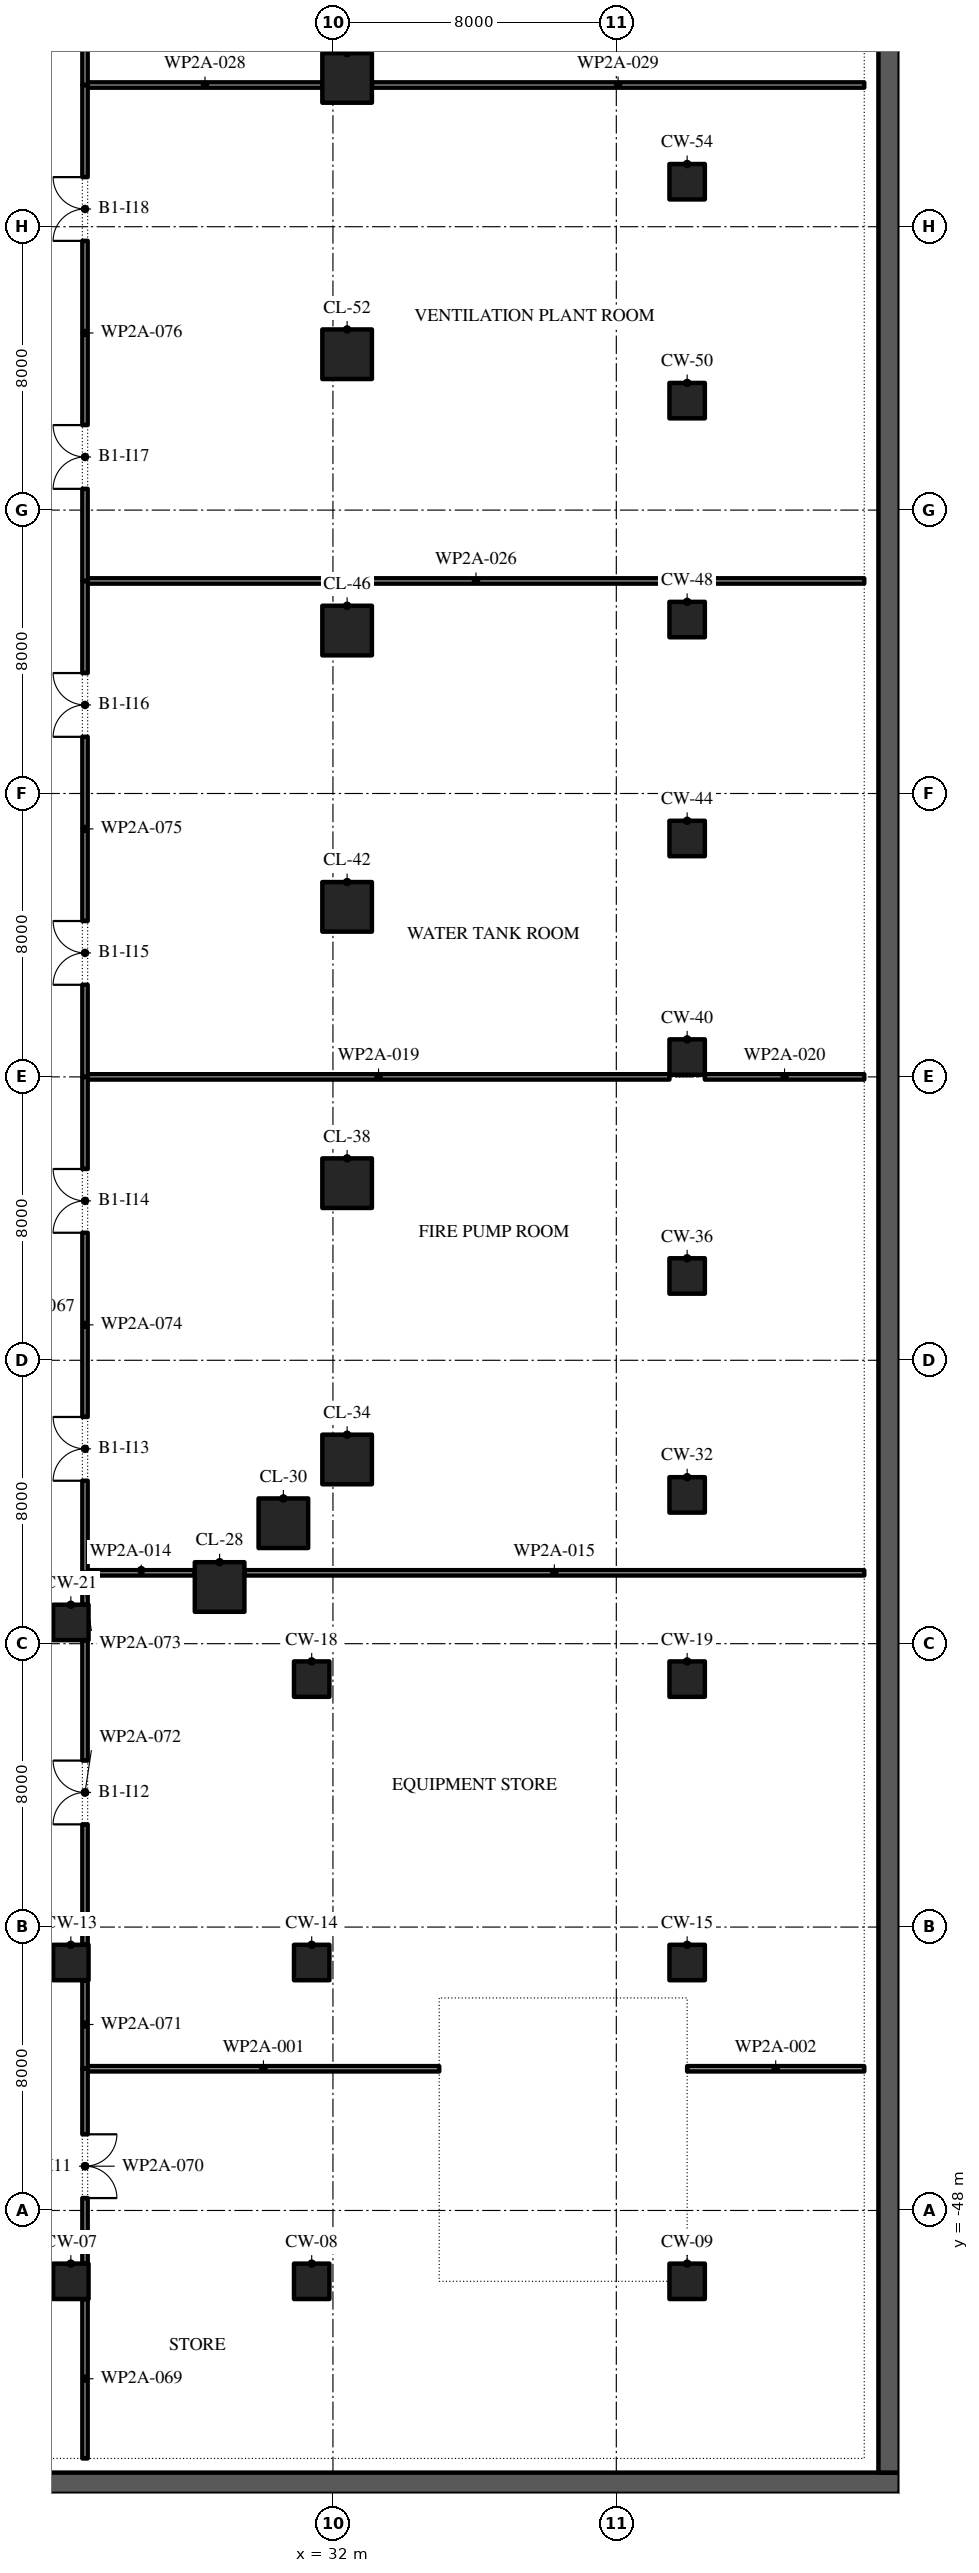
"""IFC4 building model, lengths in metres.
Left out: names, types, materials, properties, quantities, classifications, styles, units other than length and angle.
Written with IfcOpenShell. Run it as: python <this file> out.ifc"""

import sys

from ifc_helpers import new_model, si_unit, direction, frame, frame_2d, origin, origin_2d, place, context, subcontext, project, spatial, rectangle, extrude, element, fill, save


model = new_model("IFC4")
c1 = context("Model", 3, precision=1e-05, world=origin(), true_north=direction((0.0, 1.0)))
c2 = subcontext(c1, "Body", "Model", "MODEL_VIEW")
j1 = project(units=[si_unit("LENGTHUNIT", "METRE"), si_unit("PLANEANGLEUNIT", "RADIAN")], contexts=[c1])
p1 = place(None, origin())
s1 = spatial("IfcSite", under=j1, at=p1, CompositionType="ELEMENT")
p2 = place(p1, origin())
s2 = spatial("IfcBuilding", under=s1, at=p2, CompositionType="ELEMENT")
p3 = place(p2, frame((0.0, 0.0, -5.2)))
s3 = spatial("IfcBuildingStorey", under=s2, at=p3, CompositionType="ELEMENT", Elevation=-5.2)
p4 = place(p3, frame((-48.0, -55.7, 0.0), z_axis=(0.0, 0.0, 1.0), x_axis=(1.0, 0.0, 0.0)))
e1 = element("IfcWall", 1, at=p4, inside=s3, PredefinedType="SOLIDWALL", context=c2, shape_type="SweptSolid", body=[
    extrude(rectangle(XDim=96.0, YDim=0.6, at=frame_2d((48.0, 0.0))), origin(), (0.0, 0.0, 1.0), 4.8),
])
p5 = place(p3, frame((47.7, -55.4, 0.0), z_axis=(0.0, 0.0, 1.0), x_axis=(0.0, 1.0, 0.0)))
e2 = element("IfcWall", 2, at=p5, inside=s3, PredefinedType="SOLIDWALL", context=c2, shape_type="SweptSolid", body=[
    extrude(rectangle(XDim=94.8, YDim=0.6, at=frame_2d((47.4, 0.0))), origin(), (0.0, 0.0, 1.0), 4.8),
])
for number, where, z_axis, x_axis in (
    (3, (24.6, -50.0, 0.0), (0.0, 0.0, 1.0), (1.0, 0.0, 0.0)),
    (4, (31.4, -50.0, 0.0), (0.0, 0.0, 1.0), (1.0, 0.0, 0.0)),
    (5, (42.0, -50.0, 0.0), (0.0, 0.0, 1.0), (1.0, 0.0, 0.0)),
    (6, (24.6, -41.0, 0.0), (0.0, 0.0, 1.0), (1.0, 0.0, 0.0)),
    (7, (31.4, -41.0, 0.0), (0.0, 0.0, 1.0), (1.0, 0.0, 0.0)),
    (8, (42.0, -41.0, 0.0), (0.0, 0.0, 1.0), (1.0, 0.0, 0.0)),
    (9, (31.4, -33.0, 0.0), (0.0, 0.0, 1.0), (1.0, 0.0, 0.0)),
    (10, (42.0, -33.0, 0.0), (0.0, 0.0, 1.0), (1.0, 0.0, 0.0)),
    (11, (24.6, -31.4, 0.0), (0.0, 0.0, 1.0), (1.0, 0.0, 0.0)),
):
    element("IfcColumn", number, at=place(p3, frame(where, z_axis=z_axis, x_axis=x_axis)), inside=s3, PredefinedType="COLUMN", context=c2, shape_type="SweptSolid", body=[
        extrude(rectangle(XDim=1.0, YDim=1.0, at=origin_2d()), origin(), (0.0, 0.0, 1.0), 5.2),
    ])
for number, where, z_axis, x_axis in (
    (12, (28.8, -30.4, 0.0), (0.0, 0.0, 1.0), (1.0, 0.0, 0.0)),
    (13, (30.6, -28.6, 0.0), (0.0, 0.0, 1.0), (1.0, 0.0, 0.0)),
):
    element("IfcColumn", number, at=place(p3, frame(where, z_axis=z_axis, x_axis=x_axis)), inside=s3, PredefinedType="COLUMN", context=c2, shape_type="SweptSolid", body=[
        extrude(rectangle(XDim=1.4, YDim=1.4, at=origin_2d()), origin(), (0.0, 0.0, 1.0), 5.2),
    ])
p6 = place(p3, frame((42.0, -27.8, 0.0), z_axis=(0.0, 0.0, 1.0), x_axis=(1.0, 0.0, 0.0)))
e14 = element("IfcColumn", 14, at=p6, inside=s3, PredefinedType="COLUMN", context=c2, shape_type="SweptSolid", body=[
    extrude(rectangle(XDim=1.0, YDim=1.0, at=origin_2d()), origin(), (0.0, 0.0, 1.0), 5.2),
])
p7 = place(p3, frame((32.4, -26.8, 0.0), z_axis=(0.0, 0.0, 1.0), x_axis=(1.0, 0.0, 0.0)))
e15 = element("IfcColumn", 15, at=p7, inside=s3, PredefinedType="COLUMN", context=c2, shape_type="SweptSolid", body=[
    extrude(rectangle(XDim=1.4, YDim=1.4, at=origin_2d()), origin(), (0.0, 0.0, 1.0), 5.2),
])
p8 = place(p3, frame((42.0, -21.62, 0.0), z_axis=(0.0, 0.0, 1.0), x_axis=(1.0, 0.0, 0.0)))
e16 = element("IfcColumn", 16, at=p8, inside=s3, PredefinedType="COLUMN", context=c2, shape_type="SweptSolid", body=[
    extrude(rectangle(XDim=1.0, YDim=1.0, at=origin_2d()), origin(), (0.0, 0.0, 1.0), 5.2),
])
p9 = place(p3, frame((32.4, -19.0, 0.0), z_axis=(0.0, 0.0, 1.0), x_axis=(1.0, 0.0, 0.0)))
e17 = element("IfcColumn", 17, at=p9, inside=s3, PredefinedType="COLUMN", context=c2, shape_type="SweptSolid", body=[
    extrude(rectangle(XDim=1.4, YDim=1.4, at=origin_2d()), origin(), (0.0, 0.0, 1.0), 5.2),
])
p10 = place(p3, frame((42.0, -15.44, 0.0), z_axis=(0.0, 0.0, 1.0), x_axis=(1.0, 0.0, 0.0)))
e18 = element("IfcColumn", 18, at=p10, inside=s3, PredefinedType="COLUMN", context=c2, shape_type="SweptSolid", body=[
    extrude(rectangle(XDim=1.0, YDim=1.0, at=origin_2d()), origin(), (0.0, 0.0, 1.0), 5.2),
])
p11 = place(p3, frame((32.4, -11.2, 0.0), z_axis=(0.0, 0.0, 1.0), x_axis=(1.0, 0.0, 0.0)))
e19 = element("IfcColumn", 19, at=p11, inside=s3, PredefinedType="COLUMN", context=c2, shape_type="SweptSolid", body=[
    extrude(rectangle(XDim=1.4, YDim=1.4, at=origin_2d()), origin(), (0.0, 0.0, 1.0), 5.2),
])
p12 = place(p3, frame((42.0, -9.27, 0.0), z_axis=(0.0, 0.0, 1.0), x_axis=(1.0, 0.0, 0.0)))
e20 = element("IfcColumn", 20, at=p12, inside=s3, PredefinedType="COLUMN", context=c2, shape_type="SweptSolid", body=[
    extrude(rectangle(XDim=1.0, YDim=1.0, at=origin_2d()), origin(), (0.0, 0.0, 1.0), 5.2),
])
p13 = place(p3, frame((32.4, -3.4, 0.0), z_axis=(0.0, 0.0, 1.0), x_axis=(1.0, 0.0, 0.0)))
e21 = element("IfcColumn", 21, at=p13, inside=s3, PredefinedType="COLUMN", context=c2, shape_type="SweptSolid", body=[
    extrude(rectangle(XDim=1.4, YDim=1.4, at=origin_2d()), origin(), (0.0, 0.0, 1.0), 5.2),
])
for number, where, z_axis, x_axis in (
    (22, (42.0, -3.09, 0.0), (0.0, 0.0, 1.0), (1.0, 0.0, 0.0)),
    (23, (42.0, 3.09, 0.0), (0.0, 0.0, 1.0), (1.0, 0.0, 0.0)),
):
    element("IfcColumn", number, at=place(p3, frame(where, z_axis=z_axis, x_axis=x_axis)), inside=s3, PredefinedType="COLUMN", context=c2, shape_type="SweptSolid", body=[
        extrude(rectangle(XDim=1.0, YDim=1.0, at=origin_2d()), origin(), (0.0, 0.0, 1.0), 5.2),
    ])
p14 = place(p3, frame((32.4, 4.4, 0.0), z_axis=(0.0, 0.0, 1.0), x_axis=(1.0, 0.0, 0.0)))
e24 = element("IfcColumn", 24, at=p14, inside=s3, PredefinedType="COLUMN", context=c2, shape_type="SweptSolid", body=[
    extrude(rectangle(XDim=1.4, YDim=1.4, at=origin_2d()), origin(), (0.0, 0.0, 1.0), 5.2),
])
p15 = place(p3, frame((42.0, 9.27, 0.0), z_axis=(0.0, 0.0, 1.0), x_axis=(1.0, 0.0, 0.0)))
e25 = element("IfcColumn", 25, at=p15, inside=s3, PredefinedType="COLUMN", context=c2, shape_type="SweptSolid", body=[
    extrude(rectangle(XDim=1.0, YDim=1.0, at=origin_2d()), origin(), (0.0, 0.0, 1.0), 5.2),
])
p16 = place(p3, frame((32.4, 12.2, 0.0), z_axis=(0.0, 0.0, 1.0), x_axis=(1.0, 0.0, 0.0)))
e26 = element("IfcColumn", 26, at=p16, inside=s3, PredefinedType="COLUMN", context=c2, shape_type="SweptSolid", body=[
    extrude(rectangle(XDim=1.4, YDim=1.4, at=origin_2d()), origin(), (0.0, 0.0, 1.0), 5.2),
])
p17 = place(p3, frame((25.075, -44.0, 0.0), z_axis=(0.0, 0.0, 1.0), x_axis=(1.0, 0.0, 0.0)))
e27 = element("IfcWall", 27, at=p17, inside=s3, PredefinedType="PARTITIONING", context=c2, shape_type="SweptSolid", body=[
    extrude(rectangle(XDim=9.925, YDim=0.15, at=frame_2d((4.962, 0.0))), origin(), (0.0, 0.0, 1.0), 4.9),
])
p18 = place(p3, frame((42.0, -44.0, 0.0), z_axis=(0.0, 0.0, 1.0), x_axis=(1.0, 0.0, 0.0)))
e28 = element("IfcWall", 28, at=p18, inside=s3, PredefinedType="PARTITIONING", context=c2, shape_type="SweptSolid", body=[
    extrude(rectangle(XDim=5.0, YDim=0.15, at=frame_2d((2.5, 0.0))), origin(), (0.0, 0.0, 1.0), 4.9),
])
p19 = place(p3, frame((25.075, -30.0, 0.0), z_axis=(0.0, 0.0, 1.0), x_axis=(1.0, 0.0, 0.0)))
e29 = element("IfcWall", 29, at=p19, inside=s3, PredefinedType="PARTITIONING", context=c2, shape_type="SweptSolid", body=[
    extrude(rectangle(XDim=3.025, YDim=0.15, at=frame_2d((1.513, 0.0))), origin(), (0.0, 0.0, 1.0), 4.9),
])
p20 = place(p3, frame((29.5, -30.0, 0.0), z_axis=(0.0, 0.0, 1.0), x_axis=(1.0, 0.0, 0.0)))
e30 = element("IfcWall", 30, at=p20, inside=s3, PredefinedType="PARTITIONING", context=c2, shape_type="SweptSolid", body=[
    extrude(rectangle(XDim=17.5, YDim=0.15, at=frame_2d((8.75, 0.0))), origin(), (0.0, 0.0, 1.0), 4.9),
])
p21 = place(p3, frame((25.075, -16.0, 0.0), z_axis=(0.0, 0.0, 1.0), x_axis=(1.0, 0.0, 0.0)))
e31 = element("IfcWall", 31, at=p21, inside=s3, PredefinedType="PARTITIONING", context=c2, shape_type="SweptSolid", body=[
    extrude(rectangle(XDim=16.425, YDim=0.15, at=frame_2d((8.212, 0.0))), origin(), (0.0, 0.0, 1.0), 4.9),
])
p22 = place(p3, frame((42.5, -16.0, 0.0), z_axis=(0.0, 0.0, 1.0), x_axis=(1.0, 0.0, 0.0)))
e32 = element("IfcWall", 32, at=p22, inside=s3, PredefinedType="PARTITIONING", context=c2, shape_type="SweptSolid", body=[
    extrude(rectangle(XDim=4.5, YDim=0.15, at=frame_2d((2.25, 0.0))), origin(), (0.0, 0.0, 1.0), 4.9),
])
p23 = place(p3, frame((25.075, -2.0, 0.0), z_axis=(0.0, 0.0, 1.0), x_axis=(1.0, 0.0, 0.0)))
e33 = element("IfcWall", 33, at=p23, inside=s3, PredefinedType="PARTITIONING", context=c2, shape_type="SweptSolid", body=[
    extrude(rectangle(XDim=21.925, YDim=0.15, at=frame_2d((10.962, 0.0))), origin(), (0.0, 0.0, 1.0), 4.9),
])
p24 = place(p3, frame((25.075, 12.0, 0.0), z_axis=(0.0, 0.0, 1.0), x_axis=(1.0, 0.0, 0.0)))
e34 = element("IfcWall", 34, at=p24, inside=s3, PredefinedType="PARTITIONING", context=c2, shape_type="SweptSolid", body=[
    extrude(rectangle(XDim=6.625, YDim=0.15, at=frame_2d((3.312, 0.0))), origin(), (0.0, 0.0, 1.0), 4.9),
])
p25 = place(p3, frame((33.1, 12.0, 0.0), z_axis=(0.0, 0.0, 1.0), x_axis=(1.0, 0.0, 0.0)))
e35 = element("IfcWall", 35, at=p25, inside=s3, PredefinedType="PARTITIONING", context=c2, shape_type="SweptSolid", body=[
    extrude(rectangle(XDim=13.9, YDim=0.15, at=frame_2d((6.95, 0.0))), origin(), (0.0, 0.0, 1.0), 4.9),
])
p26 = place(p3, frame((25.0, -55.0, 0.0), z_axis=(0.0, 0.0, 1.0), x_axis=(0.0, 1.0, 0.0)))
e36 = element("IfcWall", 36, at=p26, inside=s3, PredefinedType="PARTITIONING", context=c2, shape_type="SweptSolid", body=[
    extrude(rectangle(XDim=4.5, YDim=0.15, at=frame_2d((2.25, 0.0))), origin(), (0.0, 0.0, 1.0), 4.9),
])
p27 = place(p3, frame((25.0, -49.5, 0.0), z_axis=(0.0, 0.0, 1.0), x_axis=(0.0, 1.0, 0.0)))
e37 = element("IfcWall", 37, at=p27, inside=s3, PredefinedType="PARTITIONING", context=c2, shape_type="SweptSolid", body=[
    extrude(rectangle(XDim=5.5, YDim=0.15, at=frame_2d((2.75, 0.0))), origin(), (0.0, 0.0, 1.0), 4.9),
])
p28 = place(p27, frame((1.85, 0.0, 0.0)))
e38 = element("IfcOpeningElement", 38, at=p28, cuts=e37, PredefinedType="OPENING", context=c2, shape_type="SweptSolid", body=[
    extrude(rectangle(XDim=1.8, YDim=2.1, at=frame_2d((0.9, 1.05))), frame((0.0, 0.085, 0.0), z_axis=(0.0, -1.0, 0.0), x_axis=(1.0, 0.0, 0.0)), (0.0, 0.0, 1.0), 0.17),
])
p29 = place(p3, frame((25.0, -44.0, 0.0), z_axis=(0.0, 0.0, 1.0), x_axis=(0.0, 1.0, 0.0)))
e39 = element("IfcWall", 39, at=p29, inside=s3, PredefinedType="PARTITIONING", context=c2, shape_type="SweptSolid", body=[
    extrude(rectangle(XDim=2.5, YDim=0.15, at=frame_2d((1.25, 0.0))), origin(), (0.0, 0.0, 1.0), 4.9),
])
p30 = place(p3, frame((25.0, -40.5, 0.0), z_axis=(0.0, 0.0, 1.0), x_axis=(0.0, 1.0, 0.0)))
e40 = element("IfcWall", 40, at=p30, inside=s3, PredefinedType="PARTITIONING", context=c2, shape_type="SweptSolid", body=[
    extrude(rectangle(XDim=8.6, YDim=0.15, at=frame_2d((4.3, 0.0))), origin(), (0.0, 0.0, 1.0), 4.9),
])
p31 = place(p30, frame((3.4, 0.0, 0.0)))
e41 = element("IfcOpeningElement", 41, at=p31, cuts=e40, PredefinedType="OPENING", context=c2, shape_type="SweptSolid", body=[
    extrude(rectangle(XDim=1.8, YDim=2.1, at=frame_2d((0.9, 1.05))), frame((0.0, 0.085, 0.0), z_axis=(0.0, -1.0, 0.0), x_axis=(1.0, 0.0, 0.0)), (0.0, 0.0, 1.0), 0.17),
])
p32 = place(p3, frame((25.0, -30.9, 0.0), z_axis=(0.0, 0.0, 1.0), x_axis=(0.0, 1.0, 0.0)))
e42 = element("IfcWall", 42, at=p32, inside=s3, PredefinedType="PARTITIONING", context=c2, shape_type="SweptSolid", body=[
    extrude(rectangle(XDim=0.9, YDim=0.15, at=frame_2d((0.45, 0.0))), origin(), (0.0, 0.0, 1.0), 4.9),
])
p33 = place(p3, frame((25.0, -30.0, 0.0), z_axis=(0.0, 0.0, 1.0), x_axis=(0.0, 1.0, 0.0)))
e43 = element("IfcWall", 43, at=p33, inside=s3, PredefinedType="PARTITIONING", context=c2, shape_type="SweptSolid", body=[
    extrude(rectangle(XDim=14.0, YDim=0.15, at=frame_2d((7.0, 0.0))), origin(), (0.0, 0.0, 1.0), 4.9),
])
p34 = place(p33, frame((2.6, 0.0, 0.0)))
e44 = element("IfcOpeningElement", 44, at=p34, cuts=e43, PredefinedType="OPENING", context=c2, shape_type="SweptSolid", body=[
    extrude(rectangle(XDim=1.8, YDim=2.1, at=frame_2d((0.9, 1.05))), frame((0.0, 0.085, 0.0), z_axis=(0.0, -1.0, 0.0), x_axis=(1.0, 0.0, 0.0)), (0.0, 0.0, 1.0), 0.17),
])
p35 = place(p33, frame((9.6, 0.0, 0.0)))
e45 = element("IfcOpeningElement", 45, at=p35, cuts=e43, PredefinedType="OPENING", context=c2, shape_type="SweptSolid", body=[
    extrude(rectangle(XDim=1.8, YDim=2.1, at=frame_2d((0.9, 1.05))), frame((0.0, 0.085, 0.0), z_axis=(0.0, -1.0, 0.0), x_axis=(1.0, 0.0, 0.0)), (0.0, 0.0, 1.0), 0.17),
])
p36 = place(p3, frame((25.0, -16.0, 0.0), z_axis=(0.0, 0.0, 1.0), x_axis=(0.0, 1.0, 0.0)))
e46 = element("IfcWall", 46, at=p36, inside=s3, PredefinedType="PARTITIONING", context=c2, shape_type="SweptSolid", body=[
    extrude(rectangle(XDim=14.0, YDim=0.15, at=frame_2d((7.0, 0.0))), origin(), (0.0, 0.0, 1.0), 4.9),
])
p37 = place(p36, frame((2.6, 0.0, 0.0)))
e47 = element("IfcOpeningElement", 47, at=p37, cuts=e46, PredefinedType="OPENING", context=c2, shape_type="SweptSolid", body=[
    extrude(rectangle(XDim=1.8, YDim=2.1, at=frame_2d((0.9, 1.05))), frame((0.0, 0.085, 0.0), z_axis=(0.0, -1.0, 0.0), x_axis=(1.0, 0.0, 0.0)), (0.0, 0.0, 1.0), 0.17),
])
p38 = place(p36, frame((9.6, 0.0, 0.0)))
e48 = element("IfcOpeningElement", 48, at=p38, cuts=e46, PredefinedType="OPENING", context=c2, shape_type="SweptSolid", body=[
    extrude(rectangle(XDim=1.8, YDim=2.1, at=frame_2d((0.9, 1.05))), frame((0.0, 0.085, 0.0), z_axis=(0.0, -1.0, 0.0), x_axis=(1.0, 0.0, 0.0)), (0.0, 0.0, 1.0), 0.17),
])
p39 = place(p3, frame((25.0, -2.0, 0.0), z_axis=(0.0, 0.0, 1.0), x_axis=(0.0, 1.0, 0.0)))
e49 = element("IfcWall", 49, at=p39, inside=s3, PredefinedType="PARTITIONING", context=c2, shape_type="SweptSolid", body=[
    extrude(rectangle(XDim=14.0, YDim=0.15, at=frame_2d((7.0, 0.0))), origin(), (0.0, 0.0, 1.0), 4.9),
])
p40 = place(p39, frame((2.6, 0.0, 0.0)))
e50 = element("IfcOpeningElement", 50, at=p40, cuts=e49, PredefinedType="OPENING", context=c2, shape_type="SweptSolid", body=[
    extrude(rectangle(XDim=1.8, YDim=2.1, at=frame_2d((0.9, 1.05))), frame((0.0, 0.085, 0.0), z_axis=(0.0, -1.0, 0.0), x_axis=(1.0, 0.0, 0.0)), (0.0, 0.0, 1.0), 0.17),
])
p41 = place(p39, frame((9.6, 0.0, 0.0)))
e51 = element("IfcOpeningElement", 51, at=p41, cuts=e49, PredefinedType="OPENING", context=c2, shape_type="SweptSolid", body=[
    extrude(rectangle(XDim=1.8, YDim=2.1, at=frame_2d((0.9, 1.05))), frame((0.0, 0.085, 0.0), z_axis=(0.0, -1.0, 0.0), x_axis=(1.0, 0.0, 0.0)), (0.0, 0.0, 1.0), 0.17),
])
p42 = place(p3, frame((25.0, 12.0, 0.0), z_axis=(0.0, 0.0, 1.0), x_axis=(0.0, 1.0, 0.0)))
e52 = element("IfcWall", 52, at=p42, inside=s3, PredefinedType="PARTITIONING", context=c2, shape_type="SweptSolid", body=[
    extrude(rectangle(XDim=13.0, YDim=0.15, at=frame_2d((6.5, 0.0))), origin(), (0.0, 0.0, 1.0), 4.9),
])
p43 = place(p42, frame((5.6, 0.0, 0.0)))
e53 = element("IfcOpeningElement", 53, at=p43, cuts=e52, PredefinedType="OPENING", context=c2, shape_type="SweptSolid", body=[
    extrude(rectangle(XDim=1.8, YDim=2.1, at=frame_2d((0.9, 1.05))), frame((0.0, 0.085, 0.0), z_axis=(0.0, -1.0, 0.0), x_axis=(1.0, 0.0, 0.0)), (0.0, 0.0, 1.0), 0.17),
])
p44 = place(p28, frame((1.8, 0.0, 0.0), z_axis=(0.0, 0.0, 1.0), x_axis=(-1.0, 0.0, 0.0)))
e54 = element("IfcDoor", 54, at=p44, inside=s3, OperationType="SINGLE_SWING_RIGHT", PredefinedType="DOOR", context=c2, shape_type="SweptSolid", body=[
    extrude(rectangle(XDim=1.8, YDim=2.1, at=frame_2d((0.9, 1.05))), frame((0.0, 0.025, 0.0), z_axis=(0.0, -1.0, 0.0), x_axis=(1.0, 0.0, 0.0)), (0.0, 0.0, 1.0), 0.05),
])
fill(e38, e54)
p45 = place(p31, origin())
e55 = element("IfcDoor", 55, at=p45, inside=s3, OperationType="SINGLE_SWING_RIGHT", PredefinedType="DOOR", context=c2, shape_type="SweptSolid", body=[
    extrude(rectangle(XDim=1.8, YDim=2.1, at=frame_2d((0.9, 1.05))), frame((0.0, 0.025, 0.0), z_axis=(0.0, -1.0, 0.0), x_axis=(1.0, 0.0, 0.0)), (0.0, 0.0, 1.0), 0.05),
])
fill(e41, e55)
p46 = place(p34, origin())
e56 = element("IfcDoor", 56, at=p46, inside=s3, OperationType="SINGLE_SWING_RIGHT", PredefinedType="DOOR", context=c2, shape_type="SweptSolid", body=[
    extrude(rectangle(XDim=1.8, YDim=2.1, at=frame_2d((0.9, 1.05))), frame((0.0, 0.025, 0.0), z_axis=(0.0, -1.0, 0.0), x_axis=(1.0, 0.0, 0.0)), (0.0, 0.0, 1.0), 0.05),
])
fill(e44, e56)
p47 = place(p35, origin())
e57 = element("IfcDoor", 57, at=p47, inside=s3, OperationType="SINGLE_SWING_LEFT", PredefinedType="DOOR", context=c2, shape_type="SweptSolid", body=[
    extrude(rectangle(XDim=1.8, YDim=2.1, at=frame_2d((0.9, 1.05))), frame((0.0, 0.025, 0.0), z_axis=(0.0, -1.0, 0.0), x_axis=(1.0, 0.0, 0.0)), (0.0, 0.0, 1.0), 0.05),
])
fill(e45, e57)
p48 = place(p37, origin())
e58 = element("IfcDoor", 58, at=p48, inside=s3, OperationType="SINGLE_SWING_LEFT", PredefinedType="DOOR", context=c2, shape_type="SweptSolid", body=[
    extrude(rectangle(XDim=1.8, YDim=2.1, at=frame_2d((0.9, 1.05))), frame((0.0, 0.025, 0.0), z_axis=(0.0, -1.0, 0.0), x_axis=(1.0, 0.0, 0.0)), (0.0, 0.0, 1.0), 0.05),
])
fill(e47, e58)
p49 = place(p38, origin())
e59 = element("IfcDoor", 59, at=p49, inside=s3, OperationType="SINGLE_SWING_LEFT", PredefinedType="DOOR", context=c2, shape_type="SweptSolid", body=[
    extrude(rectangle(XDim=1.8, YDim=2.1, at=frame_2d((0.9, 1.05))), frame((0.0, 0.025, 0.0), z_axis=(0.0, -1.0, 0.0), x_axis=(1.0, 0.0, 0.0)), (0.0, 0.0, 1.0), 0.05),
])
fill(e48, e59)
p50 = place(p40, origin())
e60 = element("IfcDoor", 60, at=p50, inside=s3, OperationType="SINGLE_SWING_LEFT", PredefinedType="DOOR", context=c2, shape_type="SweptSolid", body=[
    extrude(rectangle(XDim=1.8, YDim=2.1, at=frame_2d((0.9, 1.05))), frame((0.0, 0.025, 0.0), z_axis=(0.0, -1.0, 0.0), x_axis=(1.0, 0.0, 0.0)), (0.0, 0.0, 1.0), 0.05),
])
fill(e50, e60)
p51 = place(p41, origin())
e61 = element("IfcDoor", 61, at=p51, inside=s3, OperationType="SINGLE_SWING_RIGHT", PredefinedType="DOOR", context=c2, shape_type="SweptSolid", body=[
    extrude(rectangle(XDim=1.8, YDim=2.1, at=frame_2d((0.9, 1.05))), frame((0.0, 0.025, 0.0), z_axis=(0.0, -1.0, 0.0), x_axis=(1.0, 0.0, 0.0)), (0.0, 0.0, 1.0), 0.05),
])
fill(e51, e61)
save(model, sys.argv[1])
